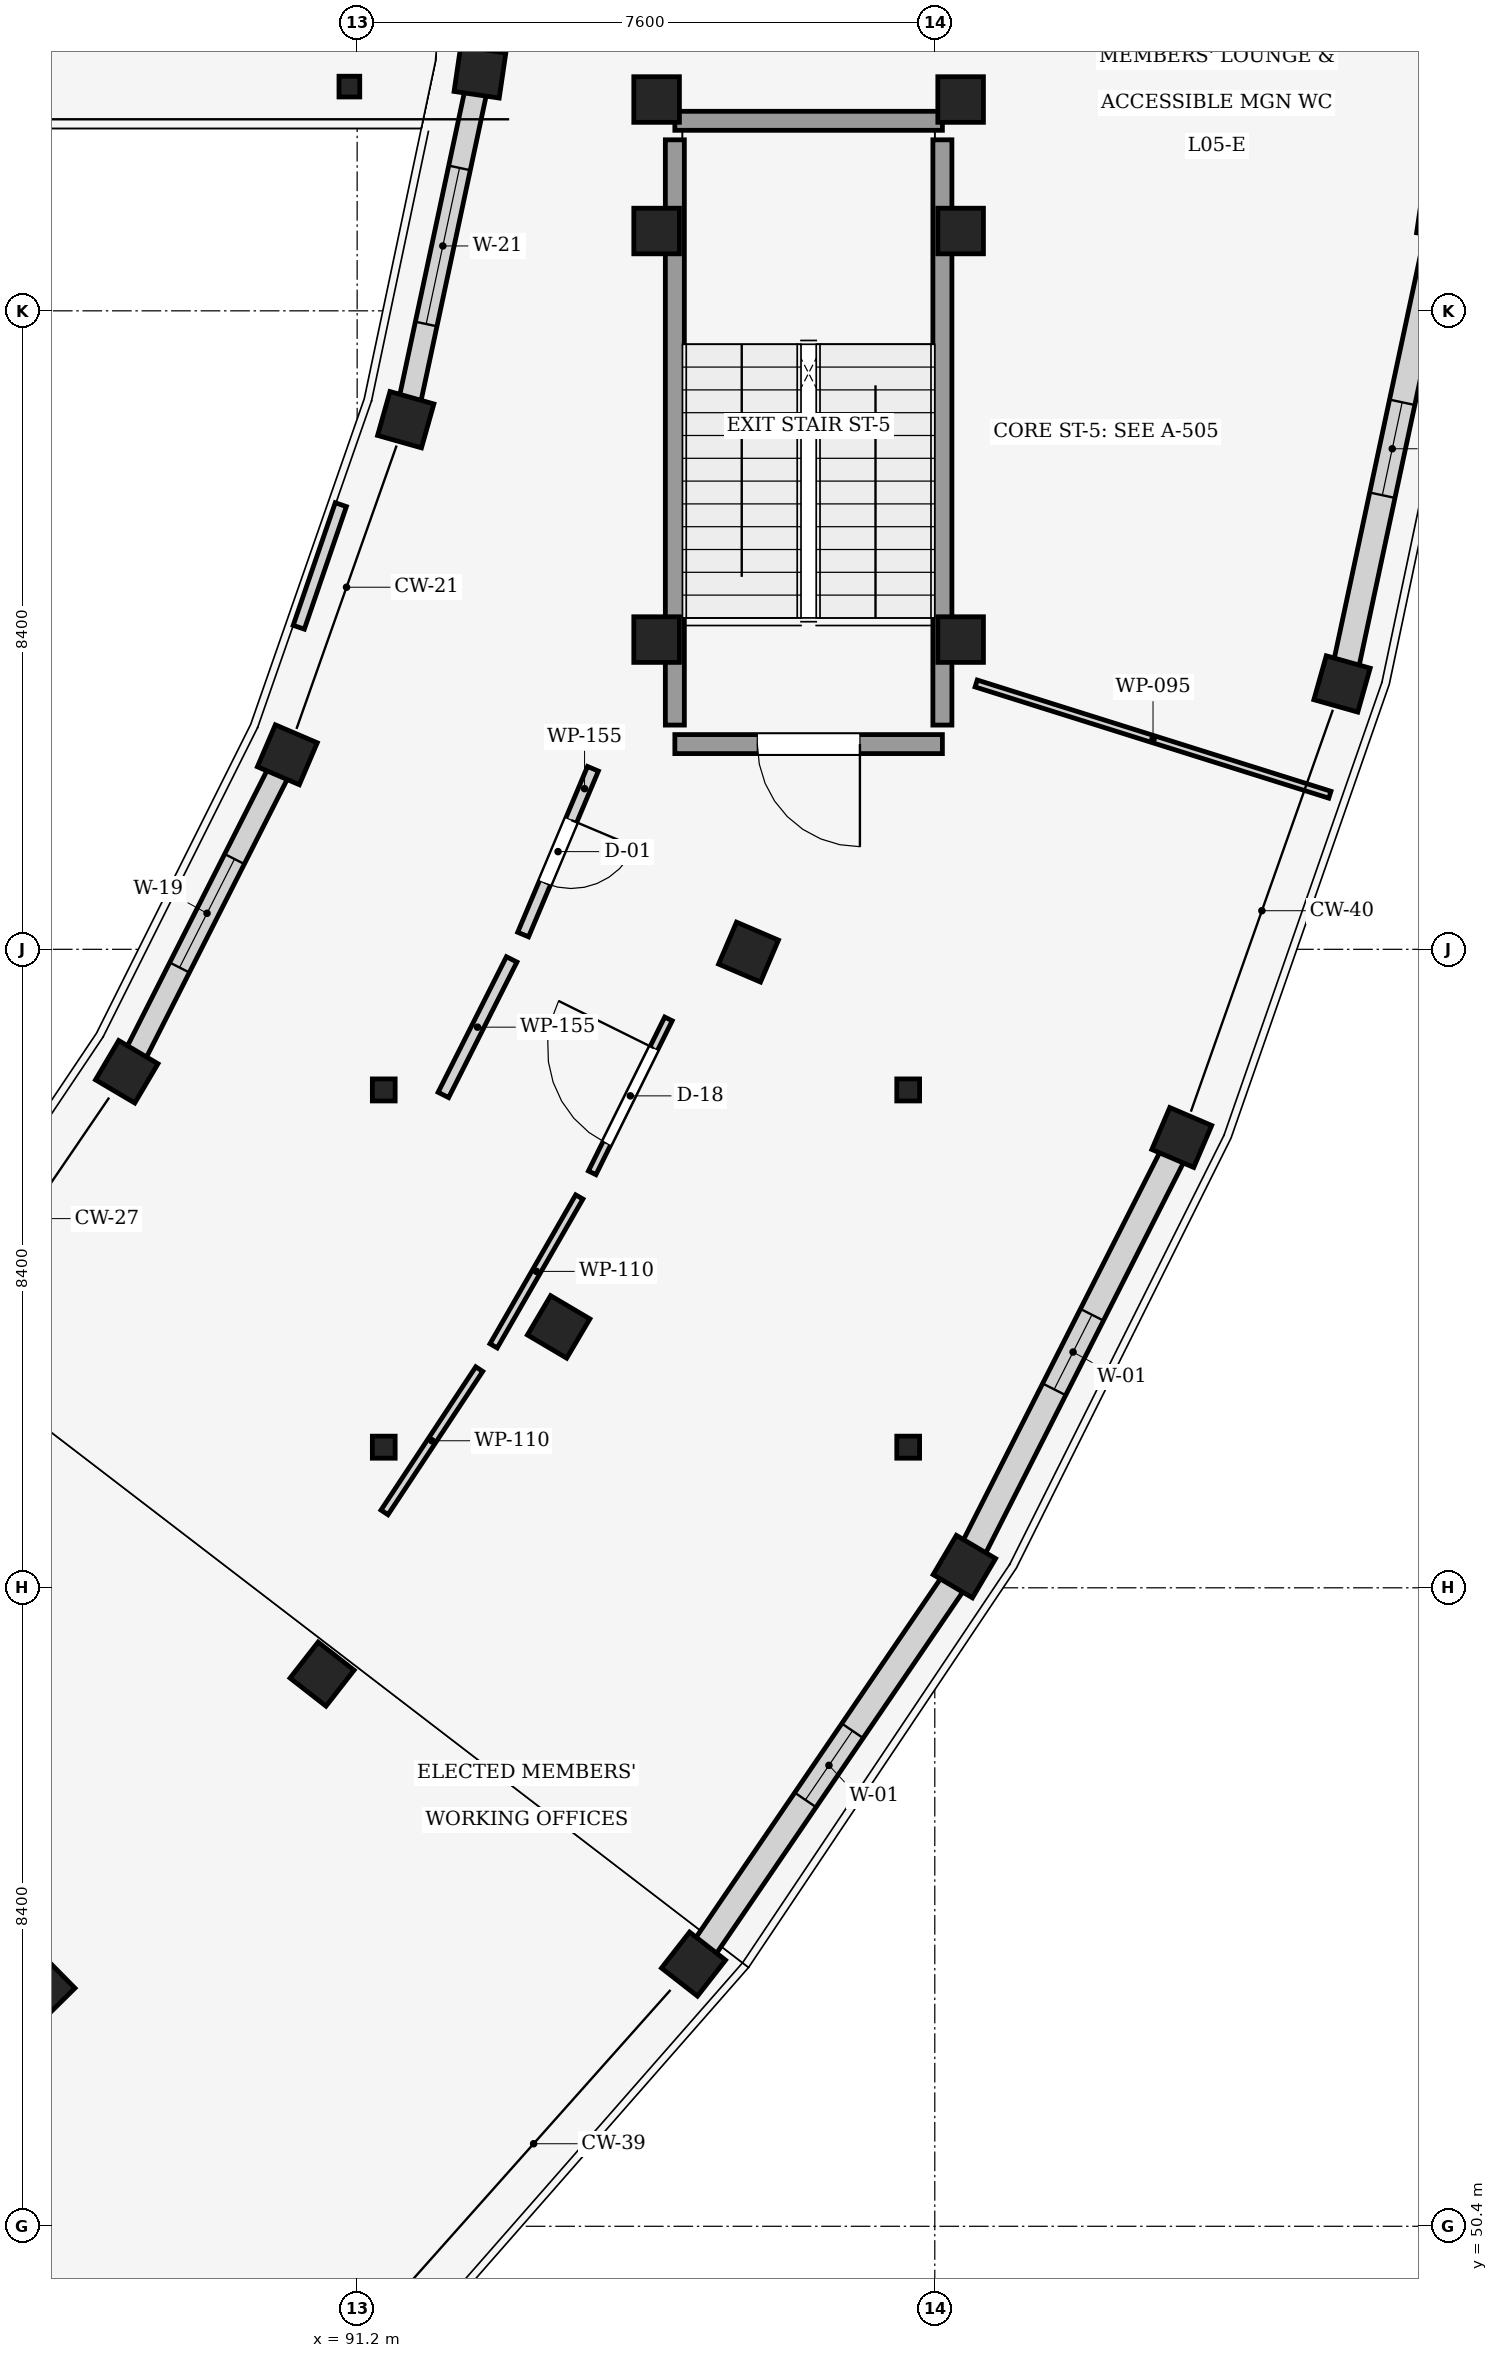
"""IFC4 building model, lengths in metres.
Left out: names, types, materials, properties, quantities, classifications, styles, units other than length and angle.
Written with IfcOpenShell. Run it as: python <this file> out.ifc"""

import sys

from ifc_helpers import new_model, si_unit, direction, frame, frame_2d, origin, origin_2d, place, context, subcontext, project, spatial, rectangle, hollow_circle, i_section, extrude, element, fill, save


model = new_model("IFC4")
c1 = context("Model", 3, precision=1e-05, world=origin(), true_north=direction((0.0, 1.0)))
c2 = subcontext(c1, "Body", "Model", "MODEL_VIEW")
j1 = project(units=[si_unit("LENGTHUNIT", "METRE"), si_unit("PLANEANGLEUNIT", "RADIAN")], contexts=[c1])
p1 = place(None, origin())
s1 = spatial("IfcSite", under=j1, at=p1, CompositionType="ELEMENT")
p2 = place(p1, origin())
s2 = spatial("IfcBuilding", under=s1, at=p2, CompositionType="ELEMENT")
p3 = place(p2, frame((0.0, 0.0, 21.3)))
s3 = spatial("IfcBuildingStorey", under=s2, at=p3, CompositionType="ELEMENT", Elevation=21.3)
for number, where, z_axis, x_axis in (
    (1, (87.063, 53.536, 0.0), (0.0, 0.0, 1.0), (0.702, -0.712, 0.0)),
    (2, (90.738, 57.664, 0.0), (0.0, 0.0, 1.0), (0.788, -0.615, 0.0)),
    (3, (95.626, 53.849, 0.0), (0.0, 0.0, 1.0), (0.788, -0.615, 0.0)),
    (4, (88.168, 65.589, 0.0), (0.0, 0.0, 1.0), (0.861, -0.509, 0.0)),
    (5, (93.851, 62.232, 0.0), (0.0, 0.0, 1.0), (0.861, -0.509, 0.0)),
    (6, (99.189, 59.079, 0.0), (0.0, 0.0, 1.0), (0.861, -0.509, 0.0)),
    (7, (90.281, 69.76, 0.0), (0.0, 0.0, 1.0), (0.919, -0.393, 0.0)),
    (8, (96.349, 67.163, 0.0), (0.0, 0.0, 1.0), (0.919, -0.393, 0.0)),
    (9, (102.049, 64.724, 0.0), (0.0, 0.0, 1.0), (0.919, -0.393, 0.0)),
    (10, (91.839, 74.168, 0.0), (0.0, 0.0, 1.0), (0.962, -0.272, 0.0)),
    (11, (104.158, 70.691, 0.0), (0.0, 0.0, 1.0), (0.962, -0.272, 0.0)),
    (12, (92.816, 78.74, 0.0), (0.0, 0.0, 1.0), (0.989, -0.145, 0.0)),
    (13, (105.48, 76.88, 0.0), (0.0, 0.0, 1.0), (0.989, -0.145, 0.0)),
):
    element("IfcColumn", number, at=place(p3, frame(where, z_axis=z_axis, x_axis=x_axis)), inside=s3, PredefinedType="COLUMN", context=c2, shape_type="SweptSolid", body=[
        extrude(rectangle(XDim=0.6, YDim=0.6, at=origin_2d()), origin(), (0.0, 0.0, 1.0), 4.05),
    ])
p4 = place(p3, frame((91.098, 78.55, 0.0), z_axis=(0.0, 0.0, 1.0), x_axis=(1.0, 0.0, 0.0)))
e14 = element("IfcColumn", 14, at=p4, inside=s3, PredefinedType="COLUMN", context=c2, shape_type="SweptSolid", body=[
    extrude(hollow_circle(Radius=0.136, WallThickness=0.016, at=origin_2d()), origin(), (0.0, 0.0, 1.0), 3.1),
])
for number, where, z_axis, x_axis in (
    (15, (99.14, 71.275, 0.0), (0.0, 0.0, 1.0), (1.0, 0.0, 0.0)),
    (16, (95.14, 71.275, 0.0), (0.0, 0.0, 1.0), (1.0, 0.0, 0.0)),
    (17, (99.14, 76.65, 0.0), (0.0, 0.0, 1.0), (1.0, 0.0, 0.0)),
    (18, (95.14, 76.65, 0.0), (0.0, 0.0, 1.0), (1.0, 0.0, 0.0)),
    (19, (99.14, 78.38, 0.0), (0.0, 0.0, 1.0), (1.0, 0.0, 0.0)),
    (20, (95.14, 78.38, 0.0), (0.0, 0.0, 1.0), (1.0, 0.0, 0.0)),
):
    element("IfcColumn", number, at=place(p3, frame(where, z_axis=z_axis, x_axis=x_axis)), inside=s3, PredefinedType="COLUMN", context=c2, shape_type="SweptSolid", body=[
        extrude(rectangle(XDim=0.6, YDim=0.6, at=origin_2d()), origin(), (0.0, 0.0, 1.0), 4.05),
    ])
for number, where, z_axis, x_axis in (
    (21, (91.55, 60.65, 0.0), (0.0, 0.0, 1.0), (1.0, 0.0, 0.0)),
    (22, (98.45, 60.65, 0.0), (0.0, 0.0, 1.0), (1.0, 0.0, 0.0)),
    (23, (98.45, 65.35, 0.0), (0.0, 0.0, 1.0), (1.0, 0.0, 0.0)),
    (24, (91.55, 65.35, 0.0), (0.0, 0.0, 1.0), (1.0, 0.0, 0.0)),
):
    element("IfcColumn", number, at=place(p3, frame(where, z_axis=z_axis, x_axis=x_axis)), inside=s3, PredefinedType="COLUMN", context=c2, shape_type="SweptSolid", body=[
        extrude(i_section(OverallWidth=0.3, OverallDepth=0.29, WebThickness=0.009, FlangeThickness=0.014, at=origin_2d()), origin(), (0.0, 0.0, 1.0), 4.05),
    ])
p5 = place(p3, frame((99.029, 58.844, 0.0), z_axis=(0.0, 0.0, 1.0), x_axis=(-0.563132935525, -0.826366321269, 0.0)))
e25 = element("IfcWall", 25, at=p5, inside=s3, PredefinedType="STANDARD", context=c2, shape_type="SweptSolid", body=[
    extrude(rectangle(XDim=5.76, YDim=0.34, at=frame_2d((2.88, 0.0))), origin(), (0.0, 0.0, 1.0), 3.005),
])
p6 = place(p5, frame((2.33, 0.0, 0.85)))
e26 = element("IfcOpeningElement", 26, at=p6, cuts=e25, PredefinedType="OPENING", context=c2, shape_type="SweptSolid", body=[
    extrude(rectangle(XDim=1.1, YDim=1.35, at=frame_2d((0.55, 0.675))), frame((0.0, 0.18, 0.0), z_axis=(0.0, -1.0, 0.0), x_axis=(1.0, 0.0, 0.0)), (0.0, 0.0, 1.0), 0.36),
])
p7 = place(p3, frame((101.93, 64.49, 0.0), z_axis=(0.0, 0.0, 1.0), x_axis=(-0.451920591159, -0.892058170349, 0.0)))
e27 = element("IfcWall", 27, at=p7, inside=s3, PredefinedType="STANDARD", context=c2, shape_type="SweptSolid", body=[
    extrude(rectangle(XDim=5.802, YDim=0.34, at=frame_2d((2.901, 0.0))), origin(), (0.0, 0.0, 1.0), 3.005),
])
p8 = place(p7, frame((2.351, 0.0, 0.85)))
e28 = element("IfcOpeningElement", 28, at=p8, cuts=e27, PredefinedType="OPENING", context=c2, shape_type="SweptSolid", body=[
    extrude(rectangle(XDim=1.1, YDim=1.35, at=frame_2d((0.55, 0.675))), frame((0.0, 0.18, 0.0), z_axis=(0.0, -1.0, 0.0), x_axis=(1.0, 0.0, 0.0)), (0.0, 0.0, 1.0), 0.36),
])
p9 = place(p3, frame((88.288, 65.824, 0.0), z_axis=(0.0, 0.0, 1.0), x_axis=(0.451915465701, 0.89206076691, 0.0)))
e29 = element("IfcWall", 29, at=p9, inside=s3, PredefinedType="STANDARD", context=c2, shape_type="SweptSolid", body=[
    extrude(rectangle(XDim=4.148, YDim=0.29, at=frame_2d((2.074, 0.0))), origin(), (0.0, 0.0, 1.0), 3.005),
])
p10 = place(p9, frame((1.274, 0.0, 0.85)))
e30 = element("IfcOpeningElement", 30, at=p10, cuts=e29, PredefinedType="OPENING", context=c2, shape_type="SweptSolid", body=[
    extrude(rectangle(XDim=1.6, YDim=1.65, at=frame_2d((0.8, 0.825))), frame((0.0, 0.155, 0.0), z_axis=(0.0, -1.0, 0.0), x_axis=(1.0, 0.0, 0.0)), (0.0, 0.0, 1.0), 0.31),
])
p11 = place(p3, frame((105.43, 76.645, 0.0), z_axis=(0.0, 0.0, 1.0), x_axis=(-0.208873267346, -0.977942717233, 0.0)))
e31 = element("IfcWall", 31, at=p11, inside=s3, PredefinedType="STANDARD", context=c2, shape_type="SweptSolid", body=[
    extrude(rectangle(XDim=5.848, YDim=0.34, at=frame_2d((2.924, 0.0))), origin(), (0.0, 0.0, 1.0), 2.45),
])
p12 = place(p11, frame((2.299, 0.0, 0.85)))
e32 = element("IfcOpeningElement", 32, at=p12, cuts=e31, PredefinedType="OPENING", context=c2, shape_type="SweptSolid", body=[
    extrude(rectangle(XDim=1.25, YDim=1.35, at=frame_2d((0.625, 0.675))), frame((0.0, 0.18, 0.0), z_axis=(0.0, -1.0, 0.0), x_axis=(1.0, 0.0, 0.0)), (0.0, 0.0, 1.0), 0.36),
])
p13 = place(p3, frame((91.889, 74.403, 0.0), z_axis=(0.0, 0.0, 1.0), x_axis=(0.208893062569, 0.977938489073, 0.0)))
e33 = element("IfcWall", 33, at=p13, inside=s3, PredefinedType="STANDARD", context=c2, shape_type="SweptSolid", body=[
    extrude(rectangle(XDim=4.195, YDim=0.29, at=frame_2d((2.097, 0.0))), origin(), (0.0, 0.0, 1.0), 3.155),
])
p14 = place(p13, frame((1.047, 0.0, 0.85)))
e34 = element("IfcOpeningElement", 34, at=p14, cuts=e33, PredefinedType="OPENING", context=c2, shape_type="SweptSolid", body=[
    extrude(rectangle(XDim=2.1, YDim=1.65, at=frame_2d((1.05, 0.825))), frame((0.0, 0.155, 0.0), z_axis=(0.0, -1.0, 0.0), x_axis=(1.0, 0.0, 0.0)), (0.0, 0.0, 1.0), 0.31),
])
p15 = place(p3, frame((98.9, 69.9, 0.0), z_axis=(0.0, 0.0, 1.0), x_axis=(-1.0, 0.0, 0.0)))
e35 = element("IfcWall", 35, at=p15, inside=s3, PredefinedType="SHEAR", context=c2, shape_type="SweptSolid", body=[
    extrude(rectangle(XDim=3.52, YDim=0.25, at=frame_2d((1.76, 0.0))), origin(), (0.0, 0.0, 1.0), 4.05),
])
p16 = place(p15, frame((1.085, 0.0, 0.0)))
e36 = element("IfcOpeningElement", 36, at=p16, cuts=e35, PredefinedType="OPENING", context=c2, shape_type="SweptSolid", body=[
    extrude(rectangle(XDim=1.35, YDim=2.2, at=frame_2d((0.675, 1.1))), frame((0.0, 0.135, 0.0), z_axis=(0.0, -1.0, 0.0), x_axis=(1.0, 0.0, 0.0)), (0.0, 0.0, 1.0), 0.27),
])
p17 = place(p3, frame((95.38, 70.15, 0.0), z_axis=(0.0, 0.0, 1.0), x_axis=(0.0, 1.0, 0.0)))
e37 = element("IfcWall", 37, at=p17, inside=s3, PredefinedType="SHEAR", context=c2, shape_type="SweptSolid", body=[
    extrude(rectangle(XDim=7.7, YDim=0.25, at=frame_2d((3.85, 0.0))), origin(), (0.0, 0.0, 1.0), 4.05),
])
p18 = place(p3, frame((95.38, 78.1, 0.0), z_axis=(0.0, 0.0, 1.0), x_axis=(1.0, 0.0, 0.0)))
e38 = element("IfcWall", 38, at=p18, inside=s3, PredefinedType="SHEAR", context=c2, shape_type="SweptSolid", body=[
    extrude(rectangle(XDim=3.52, YDim=0.25, at=frame_2d((1.76, 0.0))), origin(), (0.0, 0.0, 1.0), 4.05),
])
p19 = place(p3, frame((98.9, 77.85, 0.0), z_axis=(0.0, 0.0, 1.0), x_axis=(0.0, -1.0, 0.0)))
e39 = element("IfcWall", 39, at=p19, inside=s3, PredefinedType="SHEAR", context=c2, shape_type="SweptSolid", body=[
    extrude(rectangle(XDim=7.7, YDim=0.25, at=frame_2d((3.85, 0.0))), origin(), (0.0, 0.0, 1.0), 4.05),
])
p20 = place(p3, frame((92.995, 61.983, 0.0), z_axis=(0.0, 0.0, 1.0), x_axis=(0.498777577471, 0.866730020371, 0.0)))
e40 = element("IfcWall", 40, at=p20, inside=s3, PredefinedType="PARTITIONING", context=c2, shape_type="SweptSolid", body=[
    extrude(rectangle(XDim=2.26, YDim=0.11, at=frame_2d((1.13, 0.0))), origin(), (0.0, 0.0, 1.0), 3.005),
])
p21 = place(p3, frame((91.56, 59.792, 0.0), z_axis=(0.0, 0.0, 1.0), x_axis=(0.551555325105, 0.834138311881, 0.0)))
e41 = element("IfcWall", 41, at=p21, inside=s3, PredefinedType="PARTITIONING", context=c2, shape_type="SweptSolid", body=[
    extrude(rectangle(XDim=2.26, YDim=0.11, at=frame_2d((1.13, 0.0))), origin(), (0.0, 0.0, 1.0), 3.63),
])
p22 = place(p3, frame((94.292, 64.26, 0.0), z_axis=(0.0, 0.0, 1.0), x_axis=(0.444056726706, 0.895998673809, 0.0)))
e42 = element("IfcWall", 42, at=p22, inside=s3, PredefinedType="PARTITIONING", context=c2, shape_type="SweptSolid", body=[
    extrude(rectangle(XDim=2.26, YDim=0.11, at=frame_2d((1.13, 0.0))), origin(), (0.0, 0.0, 1.0), 3.63),
])
p23 = place(p22, frame((0.43, 0.0, 0.0)))
e43 = element("IfcOpeningElement", 43, at=p23, cuts=e42, PredefinedType="OPENING", context=c2, shape_type="SweptSolid", body=[
    extrude(rectangle(XDim=1.4, YDim=2.35, at=frame_2d((0.7, 1.175))), frame((0.0, 0.065, 0.0), z_axis=(0.0, -1.0, 0.0), x_axis=(1.0, 0.0, 0.0)), (0.0, 0.0, 1.0), 0.13),
])
p24 = place(p3, frame((103.998, 69.234, 0.0), z_axis=(0.0, 0.0, 1.0), x_axis=(-0.953940529117, 0.299995778149, 0.0)))
e44 = element("IfcWall", 44, at=p24, inside=s3, PredefinedType="PARTITIONING", context=c2, shape_type="SweptSolid", body=[
    extrude(rectangle(XDim=4.878, YDim=0.095, at=frame_2d((2.439, 0.0))), origin(), (0.0, 0.0, 1.0), 3.155),
])
p25 = place(p3, frame((94.302, 69.575, 0.0), z_axis=(0.0, 0.0, 1.0), x_axis=(-0.388172287911, -0.921586824395, 0.0)))
e45 = element("IfcWall", 45, at=p25, inside=s3, PredefinedType="PARTITIONING", context=c2, shape_type="SweptSolid", body=[
    extrude(rectangle(XDim=2.367, YDim=0.155, at=frame_2d((1.183, 0.0))), origin(), (0.0, 0.0, 1.0), 3.63),
])
p26 = place(p25, frame((0.733, 0.0, 0.0)))
e46 = element("IfcOpeningElement", 46, at=p26, cuts=e45, PredefinedType="OPENING", context=c2, shape_type="SweptSolid", body=[
    extrude(rectangle(XDim=0.9, YDim=2.1, at=frame_2d((0.45, 1.05))), frame((0.0, 0.087, 0.0), z_axis=(0.0, -1.0, 0.0), x_axis=(1.0, 0.0, 0.0)), (0.0, 0.0, 1.0), 0.175),
])
p27 = place(p3, frame((90.432, 71.437, 0.0), z_axis=(0.0, 0.0, 1.0), x_axis=(0.324463429437, 0.945898241334, 0.0)))
e47 = element("IfcWall", 47, at=p27, inside=s3, PredefinedType="PARTITIONING", context=c2, shape_type="SweptSolid", body=[
    extrude(rectangle(XDim=1.705, YDim=0.155, at=frame_2d((0.853, 0.0))), origin(), (0.0, 0.0, 1.0), 3.155),
])
p28 = place(p3, frame((93.233, 67.068, 0.0), z_axis=(0.0, 0.0, 1.0), x_axis=(-0.449901200246, -0.89307833364, 0.0)))
e48 = element("IfcWall", 48, at=p28, inside=s3, PredefinedType="PARTITIONING", context=c2, shape_type="SweptSolid", body=[
    extrude(rectangle(XDim=1.997, YDim=0.155, at=frame_2d((0.999, 0.0))), origin(), (0.0, 0.0, 1.0), 3.63),
])
p29 = place(p6, origin())
e49 = element("IfcWindow", 49, at=p29, inside=s3, PartitioningType="SINGLE_PANEL", PredefinedType="WINDOW", context=c2, shape_type="SweptSolid", body=[
    extrude(rectangle(XDim=1.1, YDim=1.35, at=frame_2d((0.55, 0.675))), frame((0.0, 0.03, 0.0), z_axis=(0.0, -1.0, 0.0), x_axis=(1.0, 0.0, 0.0)), (0.0, 0.0, 1.0), 0.06),
])
fill(e26, e49)
p30 = place(p8, origin())
e50 = element("IfcWindow", 50, at=p30, inside=s3, PartitioningType="SINGLE_PANEL", PredefinedType="WINDOW", context=c2, shape_type="SweptSolid", body=[
    extrude(rectangle(XDim=1.1, YDim=1.35, at=frame_2d((0.55, 0.675))), frame((0.0, 0.03, 0.0), z_axis=(0.0, -1.0, 0.0), x_axis=(1.0, 0.0, 0.0)), (0.0, 0.0, 1.0), 0.06),
])
fill(e28, e50)
p31 = place(p10, origin())
e51 = element("IfcWindow", 51, at=p31, inside=s3, PartitioningType="SINGLE_PANEL", PredefinedType="WINDOW", context=c2, shape_type="SweptSolid", body=[
    extrude(rectangle(XDim=1.6, YDim=1.65, at=frame_2d((0.8, 0.825))), frame((0.0, 0.03, 0.0), z_axis=(0.0, -1.0, 0.0), x_axis=(1.0, 0.0, 0.0)), (0.0, 0.0, 1.0), 0.06),
])
fill(e30, e51)
p32 = place(p12, origin())
e52 = element("IfcWindow", 52, at=p32, inside=s3, PartitioningType="SINGLE_PANEL", PredefinedType="WINDOW", context=c2, shape_type="SweptSolid", body=[
    extrude(rectangle(XDim=1.25, YDim=1.35, at=frame_2d((0.625, 0.675))), frame((0.0, 0.03, 0.0), z_axis=(0.0, -1.0, 0.0), x_axis=(1.0, 0.0, 0.0)), (0.0, 0.0, 1.0), 0.06),
])
fill(e32, e52)
p33 = place(p14, origin())
e53 = element("IfcWindow", 53, at=p33, inside=s3, PartitioningType="SINGLE_PANEL", PredefinedType="WINDOW", context=c2, shape_type="SweptSolid", body=[
    extrude(rectangle(XDim=2.1, YDim=1.65, at=frame_2d((1.05, 0.825))), frame((0.0, 0.03, 0.0), z_axis=(0.0, -1.0, 0.0), x_axis=(1.0, 0.0, 0.0)), (0.0, 0.0, 1.0), 0.06),
])
fill(e34, e53)
p34 = place(p16, origin())
e54 = element("IfcDoor", 54, at=p34, inside=s3, OperationType="SINGLE_SWING_LEFT", PredefinedType="DOOR", context=c2, shape_type="SweptSolid", body=[
    extrude(rectangle(XDim=1.35, YDim=2.2, at=frame_2d((0.675, 1.1))), frame((0.0, 0.025, 0.0), z_axis=(0.0, -1.0, 0.0), x_axis=(1.0, 0.0, 0.0)), (0.0, 0.0, 1.0), 0.05),
])
fill(e36, e54)
p35 = place(p23, origin())
e55 = element("IfcDoor", 55, at=p35, inside=s3, OperationType="SINGLE_SWING_RIGHT", PredefinedType="DOOR", context=c2, shape_type="SweptSolid", body=[
    extrude(rectangle(XDim=1.4, YDim=2.35, at=frame_2d((0.7, 1.175))), frame((0.0, 0.025, 0.0), z_axis=(0.0, -1.0, 0.0), x_axis=(1.0, 0.0, 0.0)), (0.0, 0.0, 1.0), 0.05),
])
fill(e43, e55)
p36 = place(p26, origin())
e56 = element("IfcDoor", 56, at=p36, inside=s3, OperationType="SINGLE_SWING_LEFT", PredefinedType="DOOR", context=c2, shape_type="SweptSolid", body=[
    extrude(rectangle(XDim=0.9, YDim=2.1, at=frame_2d((0.45, 1.05))), frame((0.0, 0.025, 0.0), z_axis=(0.0, -1.0, 0.0), x_axis=(1.0, 0.0, 0.0)), (0.0, 0.0, 1.0), 0.05),
])
fill(e46, e56)
save(model, sys.argv[1])
